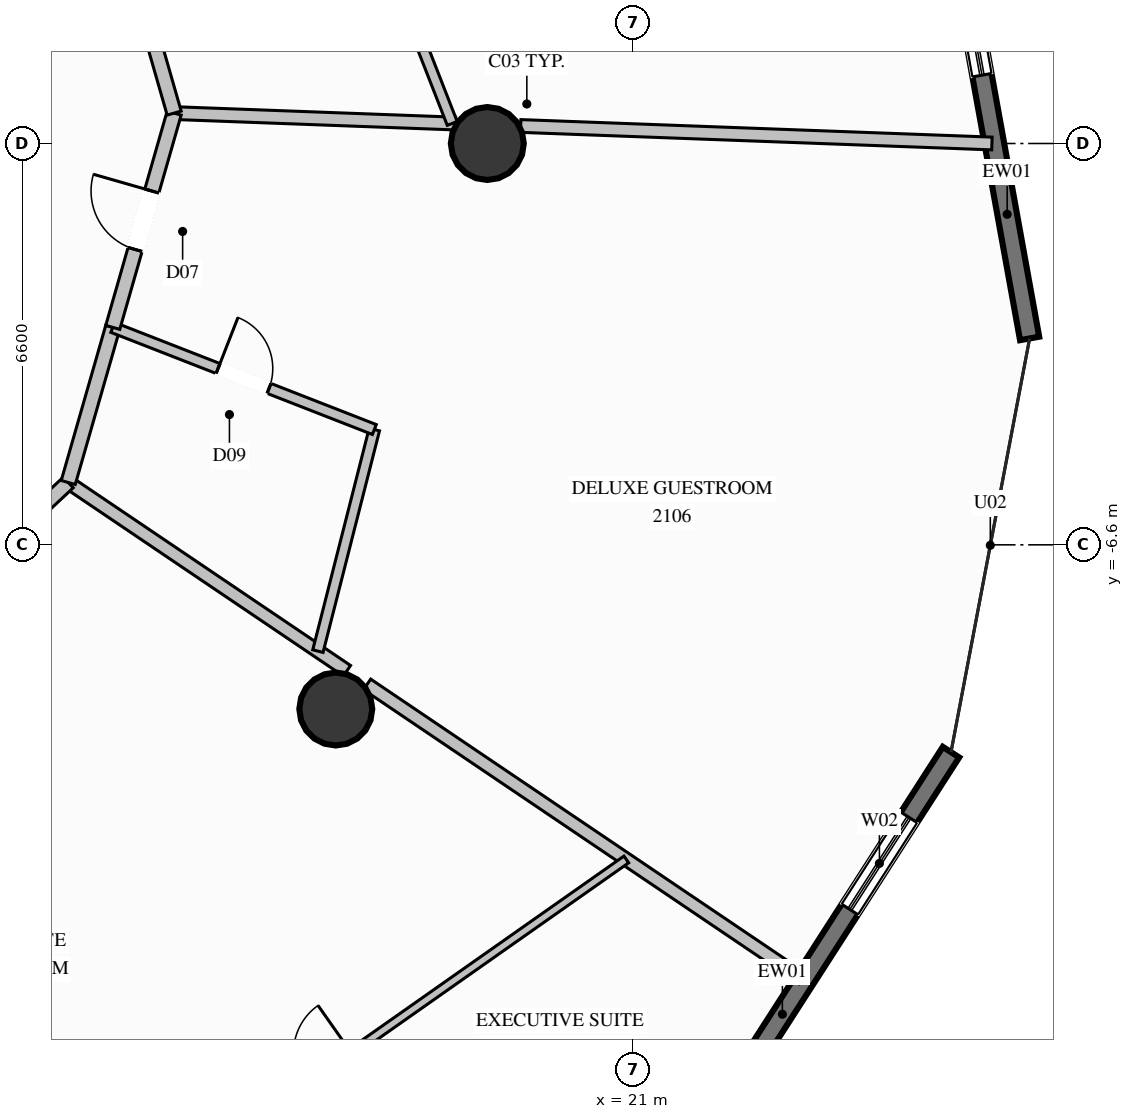
"""IFC4 building model, lengths in metres.
Left out: names, types, materials, properties, quantities, classifications, styles, units other than length and angle.
Written with IfcOpenShell. Run it as: python <this file> out.ifc"""

import sys

from ifc_helpers import new_model, si_unit, direction, frame, frame_2d, origin, origin_2d, place, context, subcontext, project, spatial, rectangle, circle, extrude, element, fill, save


model = new_model("IFC4")
c1 = context("Model", 3, precision=1e-05, world=origin(), true_north=direction((0.0, 1.0)))
c2 = subcontext(c1, "Body", "Model", "MODEL_VIEW")
j1 = project(units=[si_unit("LENGTHUNIT", "METRE"), si_unit("PLANEANGLEUNIT", "RADIAN")], contexts=[c1])
p1 = place(None, origin())
s1 = spatial("IfcSite", under=j1, at=p1, CompositionType="ELEMENT")
p2 = place(p1, origin())
s2 = spatial("IfcBuilding", under=s1, at=p2, CompositionType="ELEMENT")
p3 = place(p2, frame((0.0, 0.0, 78.8)))
s3 = spatial("IfcBuildingStorey", under=s2, at=p3, CompositionType="ELEMENT", Elevation=78.8)
for number, where, z_axis, x_axis in (
    (1, (18.6, 0.0, 0.0), (0.0, 0.0, 1.0), (1.0, 0.0, 0.0)),
    (2, (16.108, -9.3, 0.0), (0.0, 0.0, 1.0), (1.0, 0.0, 0.0)),
):
    element("IfcColumn", number, at=place(p3, frame(where, z_axis=z_axis, x_axis=x_axis)), inside=s3, PredefinedType="COLUMN", context=c2, shape_type="SweptSolid", body=[
        extrude(circle(Radius=0.6, at=origin_2d()), origin(), (0.0, 0.0, 1.0), 3.6),
    ])
p4 = place(p3, frame((26.231, 3.912, 0.0), z_axis=(0.0, 0.0, 1.0), x_axis=(0.178065653106, -0.984018609165, 0.0)))
e3 = element("IfcWall", 3, at=p4, inside=s3, PredefinedType="SOLIDWALL", context=c2, shape_type="SweptSolid", body=[
    extrude(rectangle(XDim=7.234, YDim=0.32, at=frame_2d((3.617, 0.0))), origin(), (0.0, 0.0, 1.0), 3.34),
])
p5 = place(p4, frame((1.034, 0.0, 0.35)))
e4 = element("IfcOpeningElement", 4, at=p5, cuts=e3, PredefinedType="OPENING", context=c2, shape_type="SweptSolid", body=[
    extrude(rectangle(XDim=1.8, YDim=2.6, at=frame_2d((0.9, 1.3))), frame((0.0, 0.17, 0.0), z_axis=(0.0, -1.0, 0.0), x_axis=(1.0, 0.0, 0.0)), (0.0, 0.0, 1.0), 0.34),
])
p6 = place(p3, frame((26.226, -10.009, 0.0), z_axis=(0.0, 0.0, 1.0), x_axis=(-0.541072927061, -0.840975675987, 0.0)))
e5 = element("IfcWall", 5, at=p6, inside=s3, PredefinedType="SOLIDWALL", context=c2, shape_type="SweptSolid", body=[
    extrude(rectangle(XDim=6.925, YDim=0.32, at=frame_2d((3.463, 0.0))), origin(), (0.0, 0.0, 1.0), 3.34),
])
p7 = place(p6, frame((1.276, 0.0, 0.35)))
e6 = element("IfcOpeningElement", 6, at=p7, cuts=e5, PredefinedType="OPENING", context=c2, shape_type="SweptSolid", body=[
    extrude(rectangle(XDim=1.8, YDim=2.6, at=frame_2d((0.9, 1.3))), frame((0.0, 0.17, 0.0), z_axis=(0.0, -1.0, 0.0), x_axis=(1.0, 0.0, 0.0)), (0.0, 0.0, 1.0), 0.34),
])
p8 = place(p3, frame((13.45, 0.5, 0.0), z_axis=(0.0, 0.0, 1.0), x_axis=(0.999307950313, -0.037197048837, 0.0)))
e7 = element("IfcWall", 7, at=p8, inside=s3, PredefinedType="PARTITIONING", context=c2, shape_type="SweptSolid", body=[
    extrude(rectangle(XDim=4.627, YDim=0.21, at=frame_2d((2.313, 0.0))), origin(), (0.0, 0.0, 1.0), 3.34),
])
p9 = place(p3, frame((19.149, 0.288, 0.0), z_axis=(0.0, 0.0, 1.0), x_axis=(0.999309822295, -0.037146723485, 0.0)))
e8 = element("IfcWall", 8, at=p9, inside=s3, PredefinedType="PARTITIONING", context=c2, shape_type="SweptSolid", body=[
    extrude(rectangle(XDim=7.755, YDim=0.21, at=frame_2d((3.878, 0.0))), origin(), (0.0, 0.0, 1.0), 3.34),
])
p10 = place(p3, frame((11.708, -5.575, 0.0), z_axis=(0.0, 0.0, 1.0), x_axis=(0.828701284617, -0.559691147754, 0.0)))
e9 = element("IfcWall", 9, at=p10, inside=s3, PredefinedType="PARTITIONING", context=c2, shape_type="SweptSolid", body=[
    extrude(rectangle(XDim=5.531, YDim=0.21, at=frame_2d((2.766, 0.0))), origin(), (0.0, 0.0, 1.0), 2.708),
])
p11 = place(p3, frame((16.623, -8.895, 0.0), z_axis=(0.0, 0.0, 1.0), x_axis=(0.828723201791, -0.559658694933, 0.0)))
e10 = element("IfcWall", 10, at=p11, inside=s3, PredefinedType="PARTITIONING", context=c2, shape_type="SweptSolid", body=[
    extrude(rectangle(XDim=8.641, YDim=0.21, at=frame_2d((4.32, 0.0))), origin(), (0.0, 0.0, 1.0), 3.34),
])
p12 = place(p3, frame((6.95, -10.022, 0.0), z_axis=(0.0, 0.0, 1.0), x_axis=(0.730582633102, 0.682824293804, 0.0)))
e11 = element("IfcWall", 11, at=p12, inside=s3, PredefinedType="PARTITIONING", context=c2, shape_type="SweptSolid", body=[
    extrude(rectangle(XDim=6.513, YDim=0.24, at=frame_2d((3.256, 0.0))), origin(), (0.0, 0.0, 1.0), 3.34),
])
p13 = place(p3, frame((11.062, -18.677, 0.0), z_axis=(0.0, 0.0, 1.0), x_axis=(0.818201778995, 0.574931168793, 0.0)))
e12 = element("IfcWall", 12, at=p13, inside=s3, PredefinedType="PARTITIONING", context=c2, shape_type="SweptSolid", body=[
    extrude(rectangle(XDim=12.007, YDim=0.135, at=frame_2d((6.003, 0.0))), origin(), (0.0, 0.0, 1.0), 3.34),
])
p14 = place(p13, frame((5.528, 0.0, 0.0)))
e13 = element("IfcOpeningElement", 13, at=p14, cuts=e12, PredefinedType="OPENING", context=c2, shape_type="SweptSolid", body=[
    extrude(rectangle(XDim=0.95, YDim=2.1, at=frame_2d((0.475, 1.05))), frame((0.0, 0.078, 0.0), z_axis=(0.0, -1.0, 0.0), x_axis=(1.0, 0.0, 0.0)), (0.0, 0.0, 1.0), 0.155),
])
p15 = place(p3, frame((11.708, -5.575, 0.0), z_axis=(0.0, 0.0, 1.0), x_axis=(0.275790140823, 0.961217872402, 0.0)))
e14 = element("IfcWall", 14, at=p15, inside=s3, PredefinedType="PARTITIONING", context=c2, shape_type="SweptSolid", body=[
    extrude(rectangle(XDim=2.654, YDim=0.24, at=frame_2d((1.327, 0.0))), origin(), (0.0, 0.0, 1.0), 3.34),
])
p16 = place(p3, frame((15.814, -8.348, 0.0), z_axis=(0.0, 0.0, 1.0), x_axis=(0.246795691718, 0.969067534566, 0.0)))
e15 = element("IfcWall", 15, at=p16, inside=s3, PredefinedType="PLUMBINGWALL", context=c2, shape_type="SweptSolid", body=[
    extrude(rectangle(XDim=3.76, YDim=0.175, at=frame_2d((1.88, 0.0))), origin(), (0.0, 0.0, 1.0), 2.793),
])
p17 = place(p3, frame((12.44, -3.024, 0.0), z_axis=(0.0, 0.0, 1.0), x_axis=(0.931478902407, -0.363795346823, 0.0)))
e16 = element("IfcWall", 16, at=p17, inside=s3, PredefinedType="PLUMBINGWALL", context=c2, shape_type="SweptSolid", body=[
    extrude(rectangle(XDim=4.618, YDim=0.175, at=frame_2d((2.309, 0.0))), origin(), (0.0, 0.0, 1.0), 3.34),
])
p18 = place(p17, frame((1.859, 0.0, 0.0)))
e17 = element("IfcOpeningElement", 17, at=p18, cuts=e16, PredefinedType="OPENING", context=c2, shape_type="SweptSolid", body=[
    extrude(rectangle(XDim=0.9, YDim=2.1, at=frame_2d((0.45, 1.05))), frame((0.0, 0.098, 0.0), z_axis=(0.0, -1.0, 0.0), x_axis=(1.0, 0.0, 0.0)), (0.0, 0.0, 1.0), 0.195),
])
p19 = place(p3, frame((12.44, -3.024, 0.0), z_axis=(0.0, 0.0, 1.0), x_axis=(0.275521481409, 0.961294914832, 0.0)))
e18 = element("IfcWall", 18, at=p19, inside=s3, PredefinedType="PARTITIONING", context=c2, shape_type="SweptSolid", body=[
    extrude(rectangle(XDim=3.666, YDim=0.24, at=frame_2d((1.833, 0.0))), origin(), (0.0, 0.0, 1.0), 2.918),
])
p20 = place(p19, frame((1.333, 0.0, 0.0)))
e19 = element("IfcOpeningElement", 19, at=p20, cuts=e18, PredefinedType="OPENING", context=c2, shape_type="SweptSolid", body=[
    extrude(rectangle(XDim=1.0, YDim=2.2, at=frame_2d((0.5, 1.1))), frame((0.0, 0.13, 0.0), z_axis=(0.0, -1.0, 0.0), x_axis=(1.0, 0.0, 0.0)), (0.0, 0.0, 1.0), 0.26),
])
p21 = place(p3, frame((13.45, 0.5, 0.0), z_axis=(0.0, 0.0, 1.0), x_axis=(-0.275790140823, 0.961217872402, 0.0)))
e20 = element("IfcWall", 20, at=p21, inside=s3, PredefinedType="PARTITIONING", context=c2, shape_type="SweptSolid", body=[
    extrude(rectangle(XDim=2.654, YDim=0.24, at=frame_2d((1.327, 0.0))), origin(), (0.0, 0.0, 1.0), 3.34),
])
p22 = place(p3, frame((18.023, 0.33, 0.0), z_axis=(0.0, 0.0, 1.0), x_axis=(-0.363999643281, 0.931399087229, 0.0)))
e21 = element("IfcWall", 21, at=p22, inside=s3, PredefinedType="PLUMBINGWALL", context=c2, shape_type="SweptSolid", body=[
    extrude(rectangle(XDim=3.662, YDim=0.175, at=frame_2d((1.831, 0.0))), origin(), (0.0, 0.0, 1.0), 2.793),
])
p23 = place(p5, origin())
e22 = element("IfcWindow", 22, at=p23, inside=s3, PartitioningType="SINGLE_PANEL", PredefinedType="WINDOW", context=c2, shape_type="SweptSolid", body=[
    extrude(rectangle(XDim=1.8, YDim=2.6, at=frame_2d((0.9, 1.3))), frame((0.0, 0.03, 0.0), z_axis=(0.0, -1.0, 0.0), x_axis=(1.0, 0.0, 0.0)), (0.0, 0.0, 1.0), 0.06),
])
fill(e4, e22)
p24 = place(p7, origin())
e23 = element("IfcWindow", 23, at=p24, inside=s3, PartitioningType="SINGLE_PANEL", PredefinedType="WINDOW", context=c2, shape_type="SweptSolid", body=[
    extrude(rectangle(XDim=1.8, YDim=2.6, at=frame_2d((0.9, 1.3))), frame((0.0, 0.03, 0.0), z_axis=(0.0, -1.0, 0.0), x_axis=(1.0, 0.0, 0.0)), (0.0, 0.0, 1.0), 0.06),
])
fill(e6, e23)
p25 = place(p18, origin())
e24 = element("IfcDoor", 24, at=p25, inside=s3, OperationType="SINGLE_SWING_LEFT", PredefinedType="DOOR", context=c2, shape_type="SweptSolid", body=[
    extrude(rectangle(XDim=0.9, YDim=2.1, at=frame_2d((0.45, 1.05))), frame((0.0, 0.025, 0.0), z_axis=(0.0, -1.0, 0.0), x_axis=(1.0, 0.0, 0.0)), (0.0, 0.0, 1.0), 0.05),
])
fill(e17, e24)
p26 = place(p20, origin())
e25 = element("IfcDoor", 25, at=p26, inside=s3, OperationType="SINGLE_SWING_RIGHT", PredefinedType="DOOR", context=c2, shape_type="SweptSolid", body=[
    extrude(rectangle(XDim=1.0, YDim=2.2, at=frame_2d((0.5, 1.1))), frame((0.0, 0.025, 0.0), z_axis=(0.0, -1.0, 0.0), x_axis=(1.0, 0.0, 0.0)), (0.0, 0.0, 1.0), 0.05),
])
fill(e19, e25)
save(model, sys.argv[1])
